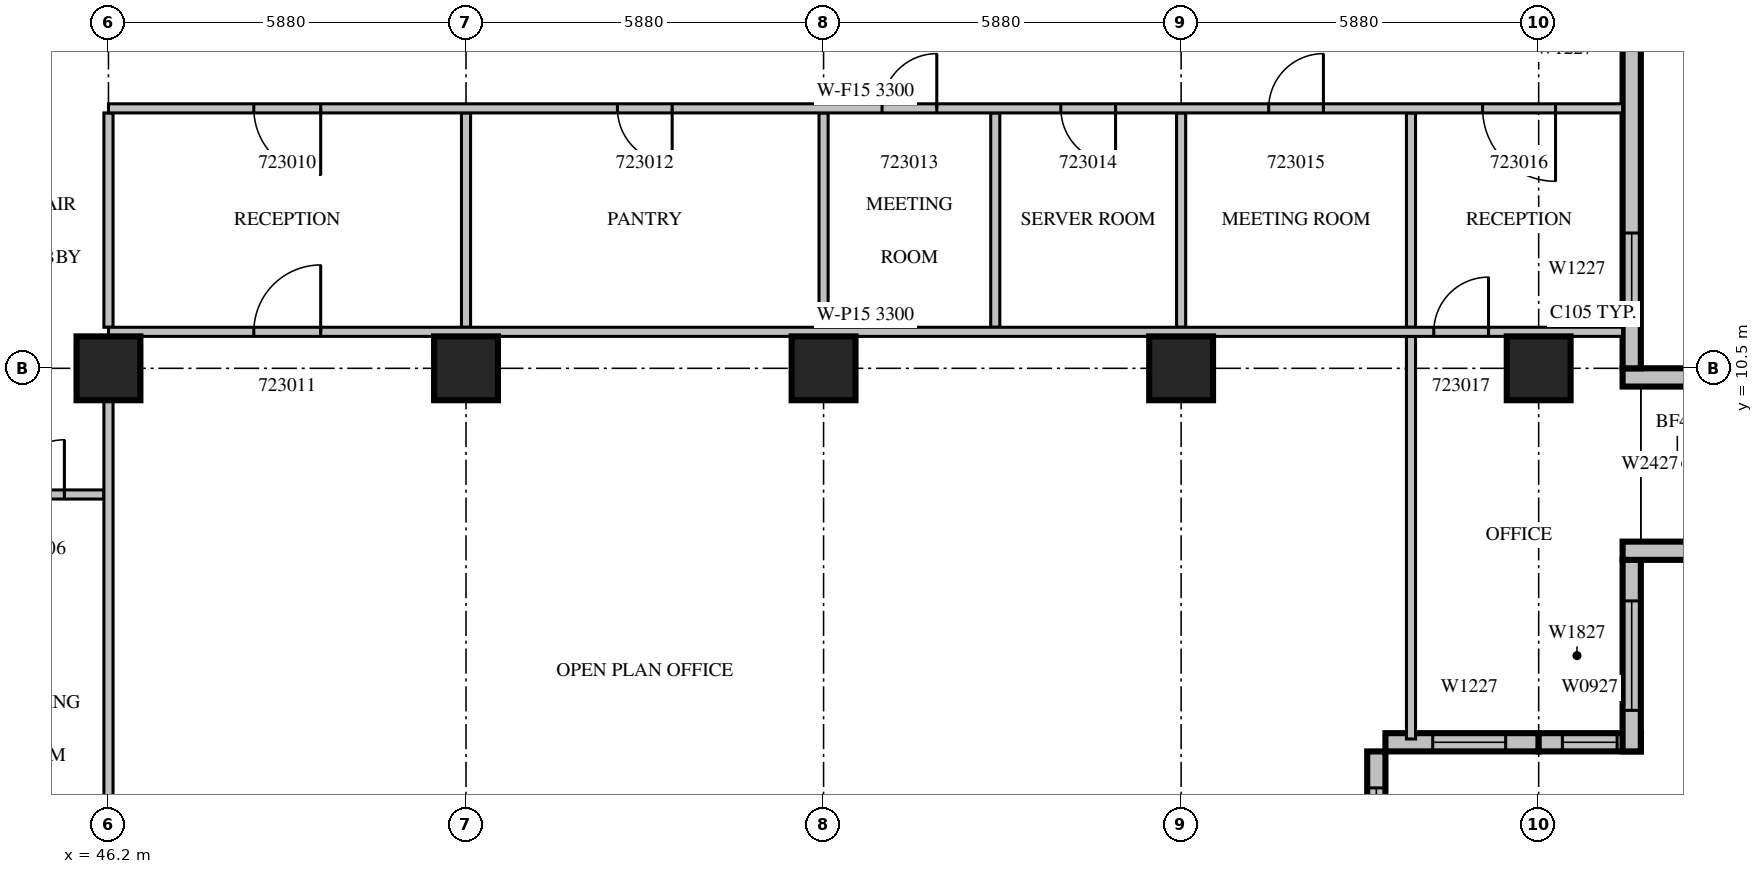
"""IFC4 building model, lengths in metres.
Left out: names, types, materials, properties, quantities, classifications, styles, units other than length and angle.
Written with IfcOpenShell. Run it as: python <this file> out.ifc"""

import sys

from ifc_helpers import new_model, si_unit, direction, frame, frame_2d, origin, origin_2d, place, context, subcontext, project, spatial, rectangle, extrude, source, transform, mapped, element, fill, save


model = new_model("IFC4")
c1 = context("Model", 3, precision=1e-05, world=origin(), true_north=direction((0.0, 1.0)))
c2 = subcontext(c1, "Body", "Model", "MODEL_VIEW")
j1 = project(units=[si_unit("LENGTHUNIT", "METRE"), si_unit("PLANEANGLEUNIT", "RADIAN")], contexts=[c1])
p1 = place(None, origin())
s1 = spatial("IfcSite", under=j1, at=p1, CompositionType="ELEMENT")
p2 = place(p1, origin())
s2 = spatial("IfcBuilding", under=s1, at=p2, CompositionType="ELEMENT")
p3 = place(p2, frame((0.0, 0.0, 107.7)))
s3 = spatial("IfcBuildingStorey", under=s2, at=p3, CompositionType="ELEMENT", Elevation=107.7)
m1 = source(origin(), c2, "Body", "SweptSolid", [
    extrude(rectangle(XDim=1.05, YDim=1.05, at=origin_2d()), origin(), (0.0, 0.0, 1.0), 4.2),
])
for number, where, z_axis, x_axis in (
    (1, (46.2, 10.5, 0.0), (0.0, 0.0, 1.0), (1.0, 0.0, 0.0)),
    (2, (52.08, 10.5, 0.0), (0.0, 0.0, 1.0), (1.0, 0.0, 0.0)),
    (3, (57.96, 10.5, 0.0), (0.0, 0.0, 1.0), (1.0, 0.0, 0.0)),
    (4, (63.84, 10.5, 0.0), (0.0, 0.0, 1.0), (1.0, 0.0, 0.0)),
    (5, (69.72, 10.5, 0.0), (0.0, 0.0, 1.0), (1.0, 0.0, 0.0)),
):
    element("IfcColumn", number, at=place(p3, frame(where, z_axis=z_axis, x_axis=x_axis)), inside=s3, PredefinedType="COLUMN", context=c2, shape_type="MappedRepresentation", body=[
        mapped(m1, transform((0.0, 0.0, 0.0), scale=1.0)),
    ])
m2 = source(origin(), c2, "Body", "SweptSolid", [
    extrude(rectangle(XDim=4.2, YDim=0.3, at=frame_2d((2.1, 0.0))), origin(), (0.0, 0.0, 1.0), 3.8),
])
p4 = place(p3, frame((67.05, 0.0, 0.0), z_axis=(0.0, 0.0, 1.0), x_axis=(0.0, 1.0, 0.0)))
e6 = element("IfcWall", 6, at=p4, inside=s3, PredefinedType="STANDARD", context=c2, shape_type="MappedRepresentation", body=[
    mapped(m2, transform((0.0, 0.0, 0.0), scale=1.0)),
])
m3 = source(origin(), c2, "Body", "SweptSolid", [
    extrude(rectangle(XDim=3.0, YDim=2.7, at=frame_2d((1.5, 1.35))), frame((0.0, 0.16, 0.0), z_axis=(0.0, -1.0, 0.0), x_axis=(1.0, 0.0, 0.0)), (0.0, 0.0, 1.0), 0.32),
])
p5 = place(p4, frame((0.6, 0.0, 0.6)))
e7 = element("IfcOpeningElement", 7, at=p5, cuts=e6, PredefinedType="OPENING", context=c2, shape_type="MappedRepresentation", body=[
    mapped(m3, transform((0.0, 0.0, 0.0), scale=1.0)),
])
m4 = source(origin(), c2, "Body", "SweptSolid", [
    extrude(rectangle(XDim=2.52, YDim=0.3, at=frame_2d((1.26, 0.0))), origin(), (0.0, 0.0, 1.0), 3.8),
])
p6 = place(p3, frame((67.2, 4.35, 0.0), z_axis=(0.0, 0.0, 1.0), x_axis=(1.0, 0.0, 0.0)))
e8 = element("IfcWall", 8, at=p6, inside=s3, PredefinedType="STANDARD", context=c2, shape_type="MappedRepresentation", body=[
    mapped(m4, transform((0.0, 0.0, 0.0), scale=1.0)),
])
m5 = source(origin(), c2, "Body", "SweptSolid", [
    extrude(rectangle(XDim=1.2, YDim=2.7, at=frame_2d((0.6, 1.35))), frame((0.0, 0.16, 0.0), z_axis=(0.0, -1.0, 0.0), x_axis=(1.0, 0.0, 0.0)), (0.0, 0.0, 1.0), 0.32),
])
p7 = place(p6, frame((0.777, 0.0, 0.6)))
e9 = element("IfcOpeningElement", 9, at=p7, cuts=e8, PredefinedType="OPENING", context=c2, shape_type="MappedRepresentation", body=[
    mapped(m5, transform((0.0, 0.0, 0.0), scale=1.0)),
])
m6 = source(origin(), c2, "Body", "SweptSolid", [
    extrude(rectangle(XDim=1.68, YDim=0.3, at=frame_2d((0.84, 0.0))), origin(), (0.0, 0.0, 1.0), 3.8),
])
p8 = place(p3, frame((69.72, 4.35, 0.0), z_axis=(0.0, 0.0, 1.0), x_axis=(1.0, 0.0, 0.0)))
e10 = element("IfcWall", 10, at=p8, inside=s3, PredefinedType="STANDARD", context=c2, shape_type="MappedRepresentation", body=[
    mapped(m6, transform((0.0, 0.0, 0.0), scale=1.0)),
])
m7 = source(origin(), c2, "Body", "SweptSolid", [
    extrude(rectangle(XDim=0.9, YDim=2.7, at=frame_2d((0.45, 1.35))), frame((0.0, 0.16, 0.0), z_axis=(0.0, -1.0, 0.0), x_axis=(1.0, 0.0, 0.0)), (0.0, 0.0, 1.0), 0.32),
])
p9 = place(p8, frame((0.39, 0.0, 0.6)))
e11 = element("IfcOpeningElement", 11, at=p9, cuts=e10, PredefinedType="OPENING", context=c2, shape_type="MappedRepresentation", body=[
    mapped(m7, transform((0.0, 0.0, 0.0), scale=1.0)),
])
m8 = source(origin(), c2, "Body", "SweptSolid", [
    extrude(rectangle(XDim=3.15, YDim=0.3, at=frame_2d((1.575, 0.0))), origin(), (0.0, 0.0, 1.0), 3.8),
])
p10 = place(p3, frame((71.25, 4.2, 0.0), z_axis=(0.0, 0.0, 1.0), x_axis=(0.0, 1.0, 0.0)))
e12 = element("IfcWall", 12, at=p10, inside=s3, PredefinedType="STANDARD", context=c2, shape_type="MappedRepresentation", body=[
    mapped(m8, transform((0.0, 0.0, 0.0), scale=1.0)),
])
m9 = source(origin(), c2, "Body", "SweptSolid", [
    extrude(rectangle(XDim=1.8, YDim=2.7, at=frame_2d((0.9, 1.35))), frame((0.0, 0.16, 0.0), z_axis=(0.0, -1.0, 0.0), x_axis=(1.0, 0.0, 0.0)), (0.0, 0.0, 1.0), 0.32),
])
p11 = place(p10, frame((0.675, 0.0, 0.6)))
e13 = element("IfcOpeningElement", 13, at=p11, cuts=e12, PredefinedType="OPENING", context=c2, shape_type="MappedRepresentation", body=[
    mapped(m9, transform((0.0, 0.0, 0.0), scale=1.0)),
])
m10 = source(origin(), c2, "Body", "SweptSolid", [
    extrude(rectangle(XDim=1.2, YDim=0.3, at=frame_2d((0.6, 0.0))), origin(), (0.0, 0.0, 1.0), 3.8),
])
for number, where, z_axis, x_axis in (
    (14, (71.1, 7.5, 0.0), (0.0, 0.0, 1.0), (1.0, 0.0, 0.0)),
    (15, (71.1, 10.35, 0.0), (0.0, 0.0, 1.0), (1.0, 0.0, 0.0)),
):
    element("IfcWall", number, at=place(p3, frame(where, z_axis=z_axis, x_axis=x_axis)), inside=s3, PredefinedType="STANDARD", context=c2, shape_type="MappedRepresentation", body=[
        mapped(m10, transform((0.0, 0.0, 0.0), scale=1.0)),
    ])
m11 = source(origin(), c2, "Body", "SweptSolid", [
    extrude(rectangle(XDim=6.3, YDim=0.3, at=frame_2d((3.15, 0.0))), origin(), (0.0, 0.0, 1.0), 3.8),
])
p12 = place(p3, frame((71.25, 10.5, 0.0), z_axis=(0.0, 0.0, 1.0), x_axis=(0.0, 1.0, 0.0)))
e16 = element("IfcWall", 16, at=p12, inside=s3, PredefinedType="STANDARD", context=c2, shape_type="MappedRepresentation", body=[
    mapped(m11, transform((0.0, 0.0, 0.0), scale=1.0)),
])
p13 = place(p12, frame((1.025, 0.0, 0.6)))
e17 = element("IfcOpeningElement", 17, at=p13, cuts=e16, PredefinedType="OPENING", context=c2, shape_type="MappedRepresentation", body=[
    mapped(m5, transform((0.0, 0.0, 0.0), scale=1.0)),
])
m12 = source(origin(), c2, "Body", "SweptSolid", [
    extrude(rectangle(XDim=2.2, YDim=0.15, at=frame_2d((1.1, 0.0))), origin(), (0.0, 0.0, 1.0), 3.8),
])
p14 = place(p3, frame((46.125, 8.425, 0.0), z_axis=(0.0, 0.0, 1.0), x_axis=(-1.0, 0.0, 0.0)))
e18 = element("IfcWall", 18, at=p14, inside=s3, PredefinedType="PARTITIONING", context=c2, shape_type="MappedRepresentation", body=[
    mapped(m12, transform((0.0, 0.0, 0.0), scale=1.0)),
])
m13 = source(origin(), c2, "Body", "SweptSolid", [
    extrude(rectangle(XDim=0.9, YDim=2.1, at=frame_2d((0.45, 1.05))), frame((0.0, 0.085, 0.0), z_axis=(0.0, -1.0, 0.0), x_axis=(1.0, 0.0, 0.0)), (0.0, 0.0, 1.0), 0.17),
])
p15 = place(p14, frame((0.65, 0.0, 0.0)))
e19 = element("IfcOpeningElement", 19, at=p15, cuts=e18, PredefinedType="OPENING", context=c2, shape_type="MappedRepresentation", body=[
    mapped(m13, transform((0.0, 0.0, 0.0), scale=1.0)),
])
m14 = source(origin(), c2, "Body", "SweptSolid", [
    extrude(rectangle(XDim=3.525, YDim=0.15, at=frame_2d((1.762, 0.0))), origin(), (0.0, 0.0, 1.0), 3.8),
])
for number, where, z_axis, x_axis in (
    (20, (52.08, 11.175, 0.0), (0.0, 0.0, 1.0), (0.0, 1.0, 0.0)),
    (21, (57.96, 11.175, 0.0), (0.0, 0.0, 1.0), (0.0, 1.0, 0.0)),
    (22, (60.784, 11.175, 0.0), (0.0, 0.0, 1.0), (0.0, 1.0, 0.0)),
    (23, (63.84, 11.175, 0.0), (0.0, 0.0, 1.0), (0.0, 1.0, 0.0)),
):
    element("IfcWall", number, at=place(p3, frame(where, z_axis=z_axis, x_axis=x_axis)), inside=s3, PredefinedType="PARTITIONING", context=c2, shape_type="MappedRepresentation", body=[
        mapped(m14, transform((0.0, 0.0, 0.0), scale=1.0)),
    ])
m15 = source(origin(), c2, "Body", "SweptSolid", [
    extrude(rectangle(XDim=8.927, YDim=0.15, at=frame_2d((4.463, 0.0))), origin(), (0.0, 0.0, 1.0), 3.8),
])
p16 = place(p3, frame((46.2, 1.049, 0.0), z_axis=(0.0, 0.0, 1.0), x_axis=(0.0, 1.0, 0.0)))
e24 = element("IfcWall", 24, at=p16, inside=s3, PredefinedType="PARTITIONING", context=c2, shape_type="MappedRepresentation", body=[
    mapped(m15, transform((0.0, 0.0, 0.0), scale=1.0)),
])
p17 = place(p3, frame((46.2, 11.175, 0.0), z_axis=(0.0, 0.0, 1.0), x_axis=(0.0, 1.0, 0.0)))
e25 = element("IfcWall", 25, at=p17, inside=s3, PredefinedType="PARTITIONING", context=c2, shape_type="MappedRepresentation", body=[
    mapped(m14, transform((0.0, 0.0, 0.0), scale=1.0)),
])
p18 = place(p3, frame((67.62, 4.405, 0.0), z_axis=(0.0, 0.0, 1.0), x_axis=(0.0, 1.0, 0.0)))
e26 = element("IfcWall", 26, at=p18, inside=s3, PredefinedType="PARTITIONING", context=c2, shape_type="SweptSolid", body=[
    extrude(rectangle(XDim=6.62, YDim=0.15, at=frame_2d((3.31, 0.0))), origin(), (0.0, 0.0, 1.0), 3.8),
])
p19 = place(p3, frame((67.62, 11.175, 0.0), z_axis=(0.0, 0.0, 1.0), x_axis=(0.0, 1.0, 0.0)))
e27 = element("IfcWall", 27, at=p19, inside=s3, PredefinedType="PARTITIONING", context=c2, shape_type="MappedRepresentation", body=[
    mapped(m14, transform((0.0, 0.0, 0.0), scale=1.0)),
])
m16 = source(origin(), c2, "Body", "SweptSolid", [
    extrude(rectangle(XDim=24.9, YDim=0.15, at=frame_2d((12.45, 0.0))), origin(), (0.0, 0.0, 1.0), 3.3),
])
p20 = place(p3, frame((71.1, 11.1, 0.0), z_axis=(0.0, 0.0, 1.0), x_axis=(-1.0, 0.0, 0.0)))
e28 = element("IfcWall", 28, at=p20, inside=s3, PredefinedType="PARTITIONING", context=c2, shape_type="MappedRepresentation", body=[
    mapped(m16, transform((0.0, 0.0, 0.0), scale=1.0)),
])
m17 = source(origin(), c2, "Body", "SweptSolid", [
    extrude(rectangle(XDim=1.1, YDim=2.1, at=frame_2d((0.55, 1.05))), frame((0.0, 0.085, 0.0), z_axis=(0.0, -1.0, 0.0), x_axis=(1.0, 0.0, 0.0)), (0.0, 0.0, 1.0), 0.17),
])
p21 = place(p20, frame((21.41, 0.0, 0.0)))
e29 = element("IfcOpeningElement", 29, at=p21, cuts=e28, PredefinedType="OPENING", context=c2, shape_type="MappedRepresentation", body=[
    mapped(m17, transform((0.0, 0.0, 0.0), scale=1.0)),
])
p22 = place(p20, frame((2.205, 0.0, 0.0)))
e30 = element("IfcOpeningElement", 30, at=p22, cuts=e28, PredefinedType="OPENING", context=c2, shape_type="MappedRepresentation", body=[
    mapped(m13, transform((0.0, 0.0, 0.0), scale=1.0)),
])
p23 = place(p3, frame((71.1, 14.775, 0.0), z_axis=(0.0, 0.0, 1.0), x_axis=(-1.0, 0.0, 0.0)))
e31 = element("IfcWall", 31, at=p23, inside=s3, PredefinedType="PARTITIONING", context=c2, shape_type="MappedRepresentation", body=[
    mapped(m16, transform((0.0, 0.0, 0.0), scale=1.0)),
])
p24 = place(p23, frame((21.41, 0.0, 0.0)))
e32 = element("IfcOpeningElement", 32, at=p24, cuts=e31, PredefinedType="OPENING", context=c2, shape_type="MappedRepresentation", body=[
    mapped(m17, transform((0.0, 0.0, 0.0), scale=1.0)),
])
p25 = place(p23, frame((15.63, 0.0, 0.0)))
e33 = element("IfcOpeningElement", 33, at=p25, cuts=e31, PredefinedType="OPENING", context=c2, shape_type="MappedRepresentation", body=[
    mapped(m13, transform((0.0, 0.0, 0.0), scale=1.0)),
])
p26 = place(p23, frame((11.278, 0.0, 0.0)))
e34 = element("IfcOpeningElement", 34, at=p26, cuts=e31, PredefinedType="OPENING", context=c2, shape_type="MappedRepresentation", body=[
    mapped(m13, transform((0.0, 0.0, 0.0), scale=1.0)),
])
p27 = place(p23, frame((8.338, 0.0, 0.0)))
e35 = element("IfcOpeningElement", 35, at=p27, cuts=e31, PredefinedType="OPENING", context=c2, shape_type="MappedRepresentation", body=[
    mapped(m13, transform((0.0, 0.0, 0.0), scale=1.0)),
])
p28 = place(p23, frame((4.92, 0.0, 0.0)))
e36 = element("IfcOpeningElement", 36, at=p28, cuts=e31, PredefinedType="OPENING", context=c2, shape_type="MappedRepresentation", body=[
    mapped(m13, transform((0.0, 0.0, 0.0), scale=1.0)),
])
m18 = source(origin(), c2, "Body", "SweptSolid", [
    extrude(rectangle(XDim=1.2, YDim=2.1, at=frame_2d((0.6, 1.05))), frame((0.0, 0.085, 0.0), z_axis=(0.0, -1.0, 0.0), x_axis=(1.0, 0.0, 0.0)), (0.0, 0.0, 1.0), 0.17),
])
p29 = place(p23, frame((1.103, 0.0, 0.0)))
e37 = element("IfcOpeningElement", 37, at=p29, cuts=e31, PredefinedType="OPENING", context=c2, shape_type="MappedRepresentation", body=[
    mapped(m18, transform((0.0, 0.0, 0.0), scale=1.0)),
])
m19 = source(origin(), c2, "Body", "SweptSolid", [
    extrude(rectangle(XDim=3.0, YDim=2.7, at=frame_2d((1.5, 1.35))), frame((0.0, 0.03, 0.0), z_axis=(0.0, -1.0, 0.0), x_axis=(1.0, 0.0, 0.0)), (0.0, 0.0, 1.0), 0.06),
])
p30 = place(p5, origin())
e38 = element("IfcWindow", 38, at=p30, inside=s3, PartitioningType="SINGLE_PANEL", PredefinedType="WINDOW", context=c2, shape_type="MappedRepresentation", body=[
    mapped(m19, transform((0.0, 0.0, 0.0), scale=1.0)),
])
fill(e7, e38)
m20 = source(origin(), c2, "Body", "SweptSolid", [
    extrude(rectangle(XDim=1.2, YDim=2.7, at=frame_2d((0.6, 1.35))), frame((0.0, 0.03, 0.0), z_axis=(0.0, -1.0, 0.0), x_axis=(1.0, 0.0, 0.0)), (0.0, 0.0, 1.0), 0.06),
])
p31 = place(p7, origin())
e39 = element("IfcWindow", 39, at=p31, inside=s3, PartitioningType="SINGLE_PANEL", PredefinedType="WINDOW", context=c2, shape_type="MappedRepresentation", body=[
    mapped(m20, transform((0.0, 0.0, 0.0), scale=1.0)),
])
fill(e9, e39)
m21 = source(origin(), c2, "Body", "SweptSolid", [
    extrude(rectangle(XDim=0.9, YDim=2.7, at=frame_2d((0.45, 1.35))), frame((0.0, 0.03, 0.0), z_axis=(0.0, -1.0, 0.0), x_axis=(1.0, 0.0, 0.0)), (0.0, 0.0, 1.0), 0.06),
])
p32 = place(p9, origin())
e40 = element("IfcWindow", 40, at=p32, inside=s3, PartitioningType="SINGLE_PANEL", PredefinedType="WINDOW", context=c2, shape_type="MappedRepresentation", body=[
    mapped(m21, transform((0.0, 0.0, 0.0), scale=1.0)),
])
fill(e11, e40)
m22 = source(origin(), c2, "Body", "SweptSolid", [
    extrude(rectangle(XDim=1.8, YDim=2.7, at=frame_2d((0.9, 1.35))), frame((0.0, 0.03, 0.0), z_axis=(0.0, -1.0, 0.0), x_axis=(1.0, 0.0, 0.0)), (0.0, 0.0, 1.0), 0.06),
])
p33 = place(p11, origin())
e41 = element("IfcWindow", 41, at=p33, inside=s3, PartitioningType="SINGLE_PANEL", PredefinedType="WINDOW", context=c2, shape_type="MappedRepresentation", body=[
    mapped(m22, transform((0.0, 0.0, 0.0), scale=1.0)),
])
fill(e13, e41)
p34 = place(p13, origin())
e42 = element("IfcWindow", 42, at=p34, inside=s3, PartitioningType="SINGLE_PANEL", PredefinedType="WINDOW", context=c2, shape_type="MappedRepresentation", body=[
    mapped(m20, transform((0.0, 0.0, 0.0), scale=1.0)),
])
fill(e17, e42)
m23 = source(origin(), c2, "Body", "SweptSolid", [
    extrude(rectangle(XDim=0.9, YDim=2.1, at=frame_2d((0.45, 1.05))), frame((0.0, 0.025, 0.0), z_axis=(0.0, -1.0, 0.0), x_axis=(1.0, 0.0, 0.0)), (0.0, 0.0, 1.0), 0.05),
])
p35 = place(p15, origin())
e43 = element("IfcDoor", 43, at=p35, inside=s3, OperationType="SINGLE_SWING_RIGHT", PredefinedType="DOOR", context=c2, shape_type="MappedRepresentation", body=[
    mapped(m23, transform((0.0, 0.0, 0.0), scale=1.0)),
])
fill(e19, e43)
m24 = source(origin(), c2, "Body", "SweptSolid", [
    extrude(rectangle(XDim=1.1, YDim=2.1, at=frame_2d((0.55, 1.05))), frame((0.0, 0.025, 0.0), z_axis=(0.0, -1.0, 0.0), x_axis=(1.0, 0.0, 0.0)), (0.0, 0.0, 1.0), 0.05),
])
p36 = place(p24, origin())
e44 = element("IfcDoor", 44, at=p36, inside=s3, OperationType="SINGLE_SWING_LEFT", PredefinedType="DOOR", context=c2, shape_type="MappedRepresentation", body=[
    mapped(m24, transform((0.0, 0.0, 0.0), scale=1.0)),
])
fill(e32, e44)
p37 = place(p21, origin())
e45 = element("IfcDoor", 45, at=p37, inside=s3, OperationType="SINGLE_SWING_RIGHT", PredefinedType="DOOR", context=c2, shape_type="MappedRepresentation", body=[
    mapped(m24, transform((0.0, 0.0, 0.0), scale=1.0)),
])
fill(e29, e45)
p38 = place(p25, origin())
e46 = element("IfcDoor", 46, at=p38, inside=s3, OperationType="SINGLE_SWING_LEFT", PredefinedType="DOOR", context=c2, shape_type="MappedRepresentation", body=[
    mapped(m23, transform((0.0, 0.0, 0.0), scale=1.0)),
])
fill(e33, e46)
p39 = place(p26, origin())
e47 = element("IfcDoor", 47, at=p39, inside=s3, OperationType="SINGLE_SWING_RIGHT", PredefinedType="DOOR", context=c2, shape_type="MappedRepresentation", body=[
    mapped(m23, transform((0.0, 0.0, 0.0), scale=1.0)),
])
fill(e34, e47)
p40 = place(p27, origin())
e48 = element("IfcDoor", 48, at=p40, inside=s3, OperationType="SINGLE_SWING_LEFT", PredefinedType="DOOR", context=c2, shape_type="MappedRepresentation", body=[
    mapped(m23, transform((0.0, 0.0, 0.0), scale=1.0)),
])
fill(e35, e48)
p41 = place(p28, origin())
e49 = element("IfcDoor", 49, at=p41, inside=s3, OperationType="SINGLE_SWING_RIGHT", PredefinedType="DOOR", context=c2, shape_type="MappedRepresentation", body=[
    mapped(m23, transform((0.0, 0.0, 0.0), scale=1.0)),
])
fill(e36, e49)
m25 = source(origin(), c2, "Body", "SweptSolid", [
    extrude(rectangle(XDim=1.2, YDim=2.1, at=frame_2d((0.6, 1.05))), frame((0.0, 0.025, 0.0), z_axis=(0.0, -1.0, 0.0), x_axis=(1.0, 0.0, 0.0)), (0.0, 0.0, 1.0), 0.05),
])
p42 = place(p29, origin())
e50 = element("IfcDoor", 50, at=p42, inside=s3, OperationType="SINGLE_SWING_LEFT", PredefinedType="DOOR", context=c2, shape_type="MappedRepresentation", body=[
    mapped(m25, transform((0.0, 0.0, 0.0), scale=1.0)),
])
fill(e37, e50)
p43 = place(p22, origin())
e51 = element("IfcDoor", 51, at=p43, inside=s3, OperationType="SINGLE_SWING_RIGHT", PredefinedType="DOOR", context=c2, shape_type="MappedRepresentation", body=[
    mapped(m23, transform((0.0, 0.0, 0.0), scale=1.0)),
])
fill(e30, e51)
save(model, sys.argv[1])
